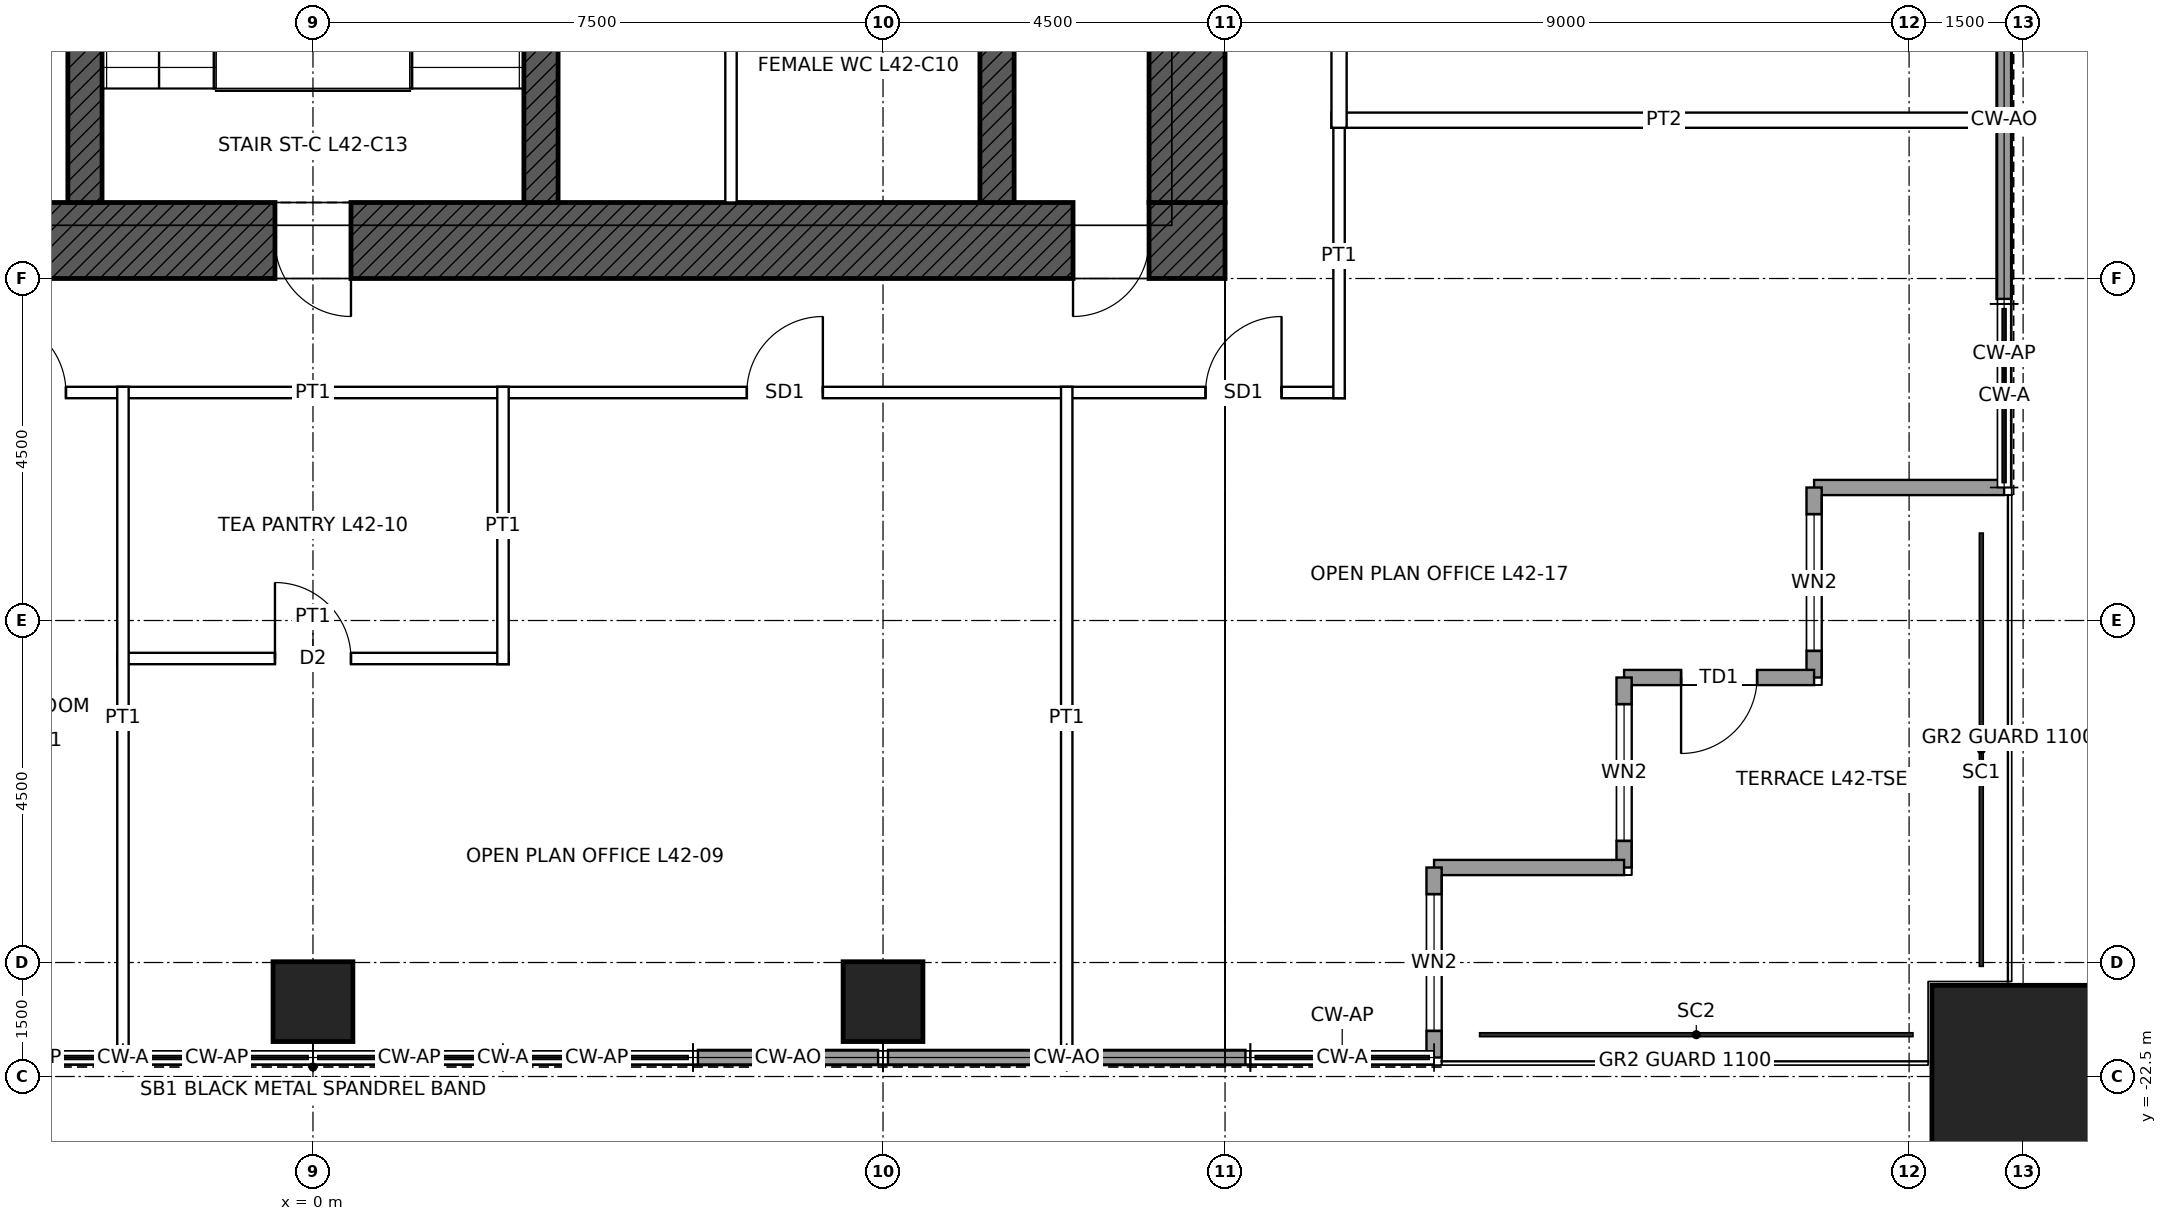
"""IFC4 building model, lengths in metres.
Left out: names, types, materials, properties, quantities, classifications, styles, units other than length and angle.
Written with IfcOpenShell. Run it as: python <this file> out.ifc"""

import sys

from ifc_helpers import new_model, si_unit, direction, frame, frame_2d, origin, origin_2d, place, context, subcontext, project, spatial, rectangle, hollow_rectangle, extrude, element, fill, save


model = new_model("IFC4")
c1 = context("Model", 3, precision=1e-05, world=origin(), true_north=direction((0.0, 1.0)))
c2 = subcontext(c1, "Body", "Model", "MODEL_VIEW")
j1 = project(units=[si_unit("LENGTHUNIT", "METRE"), si_unit("PLANEANGLEUNIT", "RADIAN")], contexts=[c1])
p1 = place(None, origin())
s1 = spatial("IfcSite", under=j1, at=p1, CompositionType="ELEMENT")
p2 = place(p1, origin())
s2 = spatial("IfcBuilding", under=s1, at=p2, CompositionType="ELEMENT")
p3 = place(p2, frame((0.0, 0.0, 201.9)))
s3 = spatial("IfcBuildingStorey", under=s2, at=p3, CompositionType="ELEMENT", Elevation=201.9)
p4 = place(p3, frame((22.5, -22.5, 0.0), z_axis=(0.0, 0.0, 1.0), x_axis=(1.0, 0.0, 0.0)))
e1 = element("IfcColumn", 1, at=p4, inside=s3, PredefinedType="COLUMN", context=c2, shape_type="SweptSolid", body=[
    extrude(hollow_rectangle(XDim=2.4, YDim=2.4, WallThickness=0.12, at=origin_2d()), origin(), (0.0, 0.0, 1.0), 4.0),
])
for number, where, z_axis, x_axis in (
    (2, (7.5, -21.515, 0.0), (0.0, 0.0, 1.0), (1.0, 0.0, 0.0)),
    (3, (0.0, -21.515, 0.0), (0.0, 0.0, 1.0), (1.0, 0.0, 0.0)),
):
    element("IfcColumn", number, at=place(p3, frame(where, z_axis=z_axis, x_axis=x_axis)), inside=s3, PredefinedType="COLUMN", context=c2, shape_type="SweptSolid", body=[
        extrude(hollow_rectangle(XDim=1.05, YDim=1.05, WallThickness=0.07, at=origin_2d()), origin(), (0.0, 0.0, 1.0), 4.0),
    ])
p5 = place(p3, frame((12.0, -11.5, 0.0), z_axis=(0.0, 0.0, 1.0), x_axis=(-1.0, 0.0, 0.0)))
e4 = element("IfcWall", 4, at=p5, inside=s3, PredefinedType="SHEAR", context=c2, shape_type="SweptSolid", body=[
    extrude(rectangle(XDim=24.0, YDim=1.0, at=frame_2d((12.0, 0.0))), origin(), (0.0, 0.0, 1.0), 4.0),
])
p6 = place(p5, frame((11.5, 0.0, 0.0)))
e5 = element("IfcOpeningElement", 5, at=p6, cuts=e4, PredefinedType="OPENING", context=c2, shape_type="SweptSolid", body=[
    extrude(rectangle(XDim=1.0, YDim=2.1, at=frame_2d((0.5, 1.05))), frame((0.0, 0.51, 0.0), z_axis=(0.0, -1.0, 0.0), x_axis=(1.0, 0.0, 0.0)), (0.0, 0.0, 1.0), 1.02),
])
p7 = place(p5, frame((1.0, 0.0, 0.0)))
e6 = element("IfcOpeningElement", 6, at=p7, cuts=e4, PredefinedType="OPENING", context=c2, shape_type="SweptSolid", body=[
    extrude(rectangle(XDim=1.0, YDim=2.4, at=frame_2d((0.5, 1.2))), frame((0.0, 0.51, 0.0), z_axis=(0.0, -1.0, 0.0), x_axis=(1.0, 0.0, 0.0)), (0.0, 0.0, 1.0), 1.02),
])
p8 = place(p3, frame((11.5, 11.0, 0.0), z_axis=(0.0, 0.0, 1.0), x_axis=(0.0, -1.0, 0.0)))
e7 = element("IfcWall", 7, at=p8, inside=s3, PredefinedType="SHEAR", context=c2, shape_type="SweptSolid", body=[
    extrude(rectangle(XDim=22.0, YDim=1.0, at=frame_2d((11.0, 0.0))), origin(), (0.0, 0.0, 1.0), 4.0),
])
p9 = place(p8, frame((10.5, 0.0, 0.0)))
e8 = element("IfcOpeningElement", 8, at=p9, cuts=e7, PredefinedType="OPENING", context=c2, shape_type="SweptSolid", body=[
    extrude(rectangle(XDim=1.0, YDim=2.4, at=frame_2d((0.5, 1.2))), frame((0.0, 0.51, 0.0), z_axis=(0.0, -1.0, 0.0), x_axis=(1.0, 0.0, 0.0)), (0.0, 0.0, 1.0), 1.02),
])
p10 = place(p3, frame((9.0, -11.0, 0.0), z_axis=(0.0, 0.0, 1.0), x_axis=(0.0, 1.0, 0.0)))
e9 = element("IfcWall", 9, at=p10, inside=s3, PredefinedType="SHEAR", context=c2, shape_type="SweptSolid", body=[
    extrude(rectangle(XDim=6.5, YDim=0.45, at=frame_2d((3.25, 0.0))), origin(), (0.0, 0.0, 1.0), 4.0),
])
p11 = place(p10, frame((4.25, 0.0, 0.0)))
e10 = element("IfcOpeningElement", 10, at=p11, cuts=e9, PredefinedType="OPENING", context=c2, shape_type="SweptSolid", body=[
    extrude(rectangle(XDim=1.0, YDim=2.1, at=frame_2d((0.5, 1.05))), frame((0.0, 0.235, 0.0), z_axis=(0.0, -1.0, 0.0), x_axis=(1.0, 0.0, 0.0)), (0.0, 0.0, 1.0), 0.47),
])
for number, where, z_axis, x_axis in (
    (11, (-3.0, -11.0, 0.0), (0.0, 0.0, 1.0), (0.0, 1.0, 0.0)),
    (12, (3.0, -11.0, 0.0), (0.0, 0.0, 1.0), (0.0, 1.0, 0.0)),
):
    element("IfcWall", number, at=place(p3, frame(where, z_axis=z_axis, x_axis=x_axis)), inside=s3, PredefinedType="SHEAR", context=c2, shape_type="SweptSolid", body=[
        extrude(rectangle(XDim=6.5, YDim=0.45, at=frame_2d((3.25, 0.0))), origin(), (0.0, 0.0, 1.0), 4.0),
    ])
p12 = place(p3, frame((22.25, -14.75, 0.0), z_axis=(0.0, 0.0, 1.0), x_axis=(-1.0, 0.0, 0.0)))
e13 = element("IfcWall", 13, at=p12, inside=s3, PredefinedType="SOLIDWALL", context=c2, shape_type="SweptSolid", body=[
    extrude(rectangle(XDim=2.5, YDim=0.2, at=frame_2d((1.25, 0.0))), origin(), (0.0, 0.0, 1.0), 3.85),
])
p13 = place(p3, frame((19.75, -14.75, 0.0), z_axis=(0.0, 0.0, 1.0), x_axis=(0.0, -1.0, 0.0)))
e14 = element("IfcWall", 14, at=p13, inside=s3, PredefinedType="SOLIDWALL", context=c2, shape_type="SweptSolid", body=[
    extrude(rectangle(XDim=2.5, YDim=0.2, at=frame_2d((1.25, 0.0))), origin(), (0.0, 0.0, 1.0), 3.85),
])
p14 = place(p13, frame((0.35, 0.0, 0.3)))
e15 = element("IfcOpeningElement", 15, at=p14, cuts=e14, PredefinedType="OPENING", context=c2, shape_type="SweptSolid", body=[
    extrude(rectangle(XDim=1.8, YDim=2.4, at=frame_2d((0.9, 1.2))), frame((0.0, 0.11, 0.0), z_axis=(0.0, -1.0, 0.0), x_axis=(1.0, 0.0, 0.0)), (0.0, 0.0, 1.0), 0.22),
])
p15 = place(p3, frame((19.75, -17.25, 0.0), z_axis=(0.0, 0.0, 1.0), x_axis=(-1.0, 0.0, 0.0)))
e16 = element("IfcWall", 16, at=p15, inside=s3, PredefinedType="SOLIDWALL", context=c2, shape_type="SweptSolid", body=[
    extrude(rectangle(XDim=2.5, YDim=0.2, at=frame_2d((1.25, 0.0))), origin(), (0.0, 0.0, 1.0), 3.85),
])
p16 = place(p15, frame((0.75, 0.0, 0.0)))
e17 = element("IfcOpeningElement", 17, at=p16, cuts=e16, PredefinedType="OPENING", context=c2, shape_type="SweptSolid", body=[
    extrude(rectangle(XDim=1.0, YDim=2.4, at=frame_2d((0.5, 1.2))), frame((0.0, 0.11, 0.0), z_axis=(0.0, -1.0, 0.0), x_axis=(1.0, 0.0, 0.0)), (0.0, 0.0, 1.0), 0.22),
])
p17 = place(p3, frame((17.25, -17.25, 0.0), z_axis=(0.0, 0.0, 1.0), x_axis=(0.0, -1.0, 0.0)))
e18 = element("IfcWall", 18, at=p17, inside=s3, PredefinedType="SOLIDWALL", context=c2, shape_type="SweptSolid", body=[
    extrude(rectangle(XDim=2.5, YDim=0.2, at=frame_2d((1.25, 0.0))), origin(), (0.0, 0.0, 1.0), 3.85),
])
p18 = place(p17, frame((0.35, 0.0, 0.3)))
e19 = element("IfcOpeningElement", 19, at=p18, cuts=e18, PredefinedType="OPENING", context=c2, shape_type="SweptSolid", body=[
    extrude(rectangle(XDim=1.8, YDim=2.4, at=frame_2d((0.9, 1.2))), frame((0.0, 0.11, 0.0), z_axis=(0.0, -1.0, 0.0), x_axis=(1.0, 0.0, 0.0)), (0.0, 0.0, 1.0), 0.22),
])
p19 = place(p3, frame((17.25, -19.75, 0.0), z_axis=(0.0, 0.0, 1.0), x_axis=(-1.0, 0.0, 0.0)))
e20 = element("IfcWall", 20, at=p19, inside=s3, PredefinedType="SOLIDWALL", context=c2, shape_type="SweptSolid", body=[
    extrude(rectangle(XDim=2.5, YDim=0.2, at=frame_2d((1.25, 0.0))), origin(), (0.0, 0.0, 1.0), 3.85),
])
p20 = place(p3, frame((14.75, -19.75, 0.0), z_axis=(0.0, 0.0, 1.0), x_axis=(0.0, -1.0, 0.0)))
e21 = element("IfcWall", 21, at=p20, inside=s3, PredefinedType="SOLIDWALL", context=c2, shape_type="SweptSolid", body=[
    extrude(rectangle(XDim=2.5, YDim=0.2, at=frame_2d((1.25, 0.0))), origin(), (0.0, 0.0, 1.0), 3.85),
])
p21 = place(p20, frame((0.35, 0.0, 0.3)))
e22 = element("IfcOpeningElement", 22, at=p21, cuts=e21, PredefinedType="OPENING", context=c2, shape_type="SweptSolid", body=[
    extrude(rectangle(XDim=1.8, YDim=2.4, at=frame_2d((0.9, 1.2))), frame((0.0, 0.11, 0.0), z_axis=(0.0, -1.0, 0.0), x_axis=(1.0, 0.0, 0.0)), (0.0, 0.0, 1.0), 0.22),
])
for number, where, z_axis, x_axis in (
    (23, (22.25, -7.565, 0.0), (0.0, 0.0, 1.0), (0.0, -1.0, 0.0)),
    (24, (22.25, -9.949, 0.0), (0.0, 0.0, 1.0), (0.0, -1.0, 0.0)),
    (25, (12.268, -22.25, 0.0), (0.0, 0.0, 1.0), (-1.0, 0.0, 0.0)),
    (26, (9.884, -22.25, 0.0), (0.0, 0.0, 1.0), (-1.0, 0.0, 0.0)),
):
    element("IfcWall", number, at=place(p3, frame(where, z_axis=z_axis, x_axis=x_axis)), inside=s3, PredefinedType="SOLIDWALL", context=c2, shape_type="SweptSolid", body=[
        extrude(rectangle(XDim=2.319, YDim=0.2, at=frame_2d((1.16, 0.0))), origin(), (0.0, 0.0, 1.0), 3.85),
    ])
p22 = place(p3, frame((7.435, -22.25, 0.0), z_axis=(0.0, 0.0, 1.0), x_axis=(-1.0, 0.0, 0.0)))
e27 = element("IfcWall", 27, at=p22, inside=s3, PredefinedType="SOLIDWALL", context=c2, shape_type="SweptSolid", body=[
    extrude(rectangle(XDim=2.37, YDim=0.2, at=frame_2d((1.185, 0.0))), origin(), (0.0, 0.0, 1.0), 3.85),
])
p23 = place(p3, frame((-2.575, -17.0, 0.0), z_axis=(0.0, 0.0, 1.0), x_axis=(1.0, 0.0, 0.0)))
e28 = element("IfcWall", 28, at=p23, inside=s3, PredefinedType="PARTITIONING", context=c2, shape_type="SweptSolid", body=[
    extrude(rectangle(XDim=5.15, YDim=0.15, at=frame_2d((2.575, 0.0))), origin(), (0.0, 0.0, 1.0), 3.85),
])
p24 = place(p23, frame((2.075, 0.0, 0.0)))
e29 = element("IfcOpeningElement", 29, at=p24, cuts=e28, PredefinedType="OPENING", context=c2, shape_type="SweptSolid", body=[
    extrude(rectangle(XDim=1.0, YDim=2.1, at=frame_2d((0.5, 1.05))), frame((0.0, 0.085, 0.0), z_axis=(0.0, -1.0, 0.0), x_axis=(1.0, 0.0, 0.0)), (0.0, 0.0, 1.0), 0.17),
])
p25 = place(p3, frame((-13.575, -13.5, 0.0), z_axis=(0.0, 0.0, 1.0), x_axis=(1.0, 0.0, 0.0)))
e30 = element("IfcWall", 30, at=p25, inside=s3, PredefinedType="PARTITIONING", context=c2, shape_type="SweptSolid", body=[
    extrude(rectangle(XDim=27.15, YDim=0.15, at=frame_2d((13.575, 0.0))), origin(), (0.0, 0.0, 1.0), 3.85),
])
p26 = place(p25, frame((19.283, 0.0, 0.0)))
e31 = element("IfcOpeningElement", 31, at=p26, cuts=e30, PredefinedType="OPENING", context=c2, shape_type="SweptSolid", body=[
    extrude(rectangle(XDim=1.0, YDim=2.4, at=frame_2d((0.5, 1.2))), frame((0.0, 0.085, 0.0), z_axis=(0.0, -1.0, 0.0), x_axis=(1.0, 0.0, 0.0)), (0.0, 0.0, 1.0), 0.17),
])
p27 = place(p25, frame((9.325, 0.0, 0.0)))
e32 = element("IfcOpeningElement", 32, at=p27, cuts=e30, PredefinedType="OPENING", context=c2, shape_type="SweptSolid", body=[
    extrude(rectangle(XDim=1.0, YDim=2.1, at=frame_2d((0.5, 1.05))), frame((0.0, 0.085, 0.0), z_axis=(0.0, -1.0, 0.0), x_axis=(1.0, 0.0, 0.0)), (0.0, 0.0, 1.0), 0.17),
])
p28 = place(p25, frame((3.825, 0.0, 0.0)))
e33 = element("IfcOpeningElement", 33, at=p28, cuts=e30, PredefinedType="OPENING", context=c2, shape_type="SweptSolid", body=[
    extrude(rectangle(XDim=1.0, YDim=2.4, at=frame_2d((0.5, 1.2))), frame((0.0, 0.085, 0.0), z_axis=(0.0, -1.0, 0.0), x_axis=(1.0, 0.0, 0.0)), (0.0, 0.0, 1.0), 0.17),
])
p29 = place(p25, frame((25.318, 0.0, 0.0)))
e34 = element("IfcOpeningElement", 34, at=p29, cuts=e30, PredefinedType="OPENING", context=c2, shape_type="SweptSolid", body=[
    extrude(rectangle(XDim=1.0, YDim=2.4, at=frame_2d((0.5, 1.2))), frame((0.0, 0.085, 0.0), z_axis=(0.0, -1.0, 0.0), x_axis=(1.0, 0.0, 0.0)), (0.0, 0.0, 1.0), 0.17),
])
p30 = place(p3, frame((13.4, -9.917, 0.0), z_axis=(0.0, 0.0, 1.0), x_axis=(1.0, 0.0, 0.0)))
e35 = element("IfcWall", 35, at=p30, inside=s3, PredefinedType="PARTITIONING", context=c2, shape_type="SweptSolid", body=[
    extrude(rectangle(XDim=8.75, YDim=0.2, at=frame_2d((4.375, 0.0))), origin(), (0.0, 0.0, 1.0), 3.85),
])
p31 = place(p3, frame((-2.5, -22.15, 0.0), z_axis=(0.0, 0.0, 1.0), x_axis=(0.0, 1.0, 0.0)))
e36 = element("IfcWall", 36, at=p31, inside=s3, PredefinedType="PARTITIONING", context=c2, shape_type="SweptSolid", body=[
    extrude(rectangle(XDim=8.725, YDim=0.15, at=frame_2d((4.362, 0.0))), origin(), (0.0, 0.0, 1.0), 3.85),
])
p32 = place(p3, frame((2.5, -17.075, 0.0), z_axis=(0.0, 0.0, 1.0), x_axis=(0.0, 1.0, 0.0)))
e37 = element("IfcWall", 37, at=p32, inside=s3, PredefinedType="PARTITIONING", context=c2, shape_type="SweptSolid", body=[
    extrude(rectangle(XDim=3.65, YDim=0.15, at=frame_2d((1.825, 0.0))), origin(), (0.0, 0.0, 1.0), 3.85),
])
p33 = place(p3, frame((9.917, -22.15, 0.0), z_axis=(0.0, 0.0, 1.0), x_axis=(0.0, 1.0, 0.0)))
e38 = element("IfcWall", 38, at=p33, inside=s3, PredefinedType="PARTITIONING", context=c2, shape_type="SweptSolid", body=[
    extrude(rectangle(XDim=8.725, YDim=0.15, at=frame_2d((4.362, 0.0))), origin(), (0.0, 0.0, 1.0), 3.85),
])
p34 = place(p3, frame((13.5, -13.575, 0.0), z_axis=(0.0, 0.0, 1.0), x_axis=(0.0, 1.0, 0.0)))
e39 = element("IfcWall", 39, at=p34, inside=s3, PredefinedType="PARTITIONING", context=c2, shape_type="SweptSolid", body=[
    extrude(rectangle(XDim=3.733, YDim=0.15, at=frame_2d((1.866, 0.0))), origin(), (0.0, 0.0, 1.0), 3.85),
])
p35 = place(p3, frame((13.5, -10.017, 0.0), z_axis=(0.0, 0.0, 1.0), x_axis=(0.0, 1.0, 0.0)))
e40 = element("IfcWall", 40, at=p35, inside=s3, PredefinedType="PARTITIONING", context=c2, shape_type="SweptSolid", body=[
    extrude(rectangle(XDim=5.117, YDim=0.2, at=frame_2d((2.559, 0.0))), origin(), (0.0, 0.0, 1.0), 3.85),
])
p36 = place(p35, frame((2.059, 0.0, 0.0)))
e41 = element("IfcOpeningElement", 41, at=p36, cuts=e40, PredefinedType="OPENING", context=c2, shape_type="SweptSolid", body=[
    extrude(rectangle(XDim=1.0, YDim=2.4, at=frame_2d((0.5, 1.2))), frame((0.0, 0.11, 0.0), z_axis=(0.0, -1.0, 0.0), x_axis=(1.0, 0.0, 0.0)), (0.0, 0.0, 1.0), 0.22),
])
p37 = place(p3, frame((5.5, -11.0, 0.0), z_axis=(0.0, 0.0, 1.0), x_axis=(0.0, 1.0, 0.0)))
e42 = element("IfcWall", 42, at=p37, inside=s3, PredefinedType="PARTITIONING", context=c2, shape_type="SweptSolid", body=[
    extrude(rectangle(XDim=6.275, YDim=0.15, at=frame_2d((3.137, 0.0))), origin(), (0.0, 0.0, 1.0), 3.75),
])
p38 = place(p37, frame((2.637, 0.0, 0.0)))
e43 = element("IfcOpeningElement", 43, at=p38, cuts=e42, PredefinedType="OPENING", context=c2, shape_type="SweptSolid", body=[
    extrude(rectangle(XDim=1.0, YDim=2.1, at=frame_2d((0.5, 1.05))), frame((0.0, 0.085, 0.0), z_axis=(0.0, -1.0, 0.0), x_axis=(1.0, 0.0, 0.0)), (0.0, 0.0, 1.0), 0.17),
])
p39 = place(p14, origin())
e44 = element("IfcWindow", 44, at=p39, inside=s3, PartitioningType="SINGLE_PANEL", PredefinedType="WINDOW", context=c2, shape_type="SweptSolid", body=[
    extrude(rectangle(XDim=1.8, YDim=2.4, at=frame_2d((0.9, 1.2))), frame((0.0, 0.03, 0.0), z_axis=(0.0, -1.0, 0.0), x_axis=(1.0, 0.0, 0.0)), (0.0, 0.0, 1.0), 0.06),
])
fill(e15, e44)
p40 = place(p16, origin())
e45 = element("IfcDoor", 45, at=p40, inside=s3, OperationType="SINGLE_SWING_RIGHT", PredefinedType="DOOR", context=c2, shape_type="SweptSolid", body=[
    extrude(rectangle(XDim=1.0, YDim=2.4, at=frame_2d((0.5, 1.2))), frame((0.0, 0.025, 0.0), z_axis=(0.0, -1.0, 0.0), x_axis=(1.0, 0.0, 0.0)), (0.0, 0.0, 1.0), 0.05),
])
fill(e17, e45)
p41 = place(p18, origin())
e46 = element("IfcWindow", 46, at=p41, inside=s3, PartitioningType="SINGLE_PANEL", PredefinedType="WINDOW", context=c2, shape_type="SweptSolid", body=[
    extrude(rectangle(XDim=1.8, YDim=2.4, at=frame_2d((0.9, 1.2))), frame((0.0, 0.03, 0.0), z_axis=(0.0, -1.0, 0.0), x_axis=(1.0, 0.0, 0.0)), (0.0, 0.0, 1.0), 0.06),
])
fill(e19, e46)
p42 = place(p21, origin())
e47 = element("IfcWindow", 47, at=p42, inside=s3, PartitioningType="SINGLE_PANEL", PredefinedType="WINDOW", context=c2, shape_type="SweptSolid", body=[
    extrude(rectangle(XDim=1.8, YDim=2.4, at=frame_2d((0.9, 1.2))), frame((0.0, 0.03, 0.0), z_axis=(0.0, -1.0, 0.0), x_axis=(1.0, 0.0, 0.0)), (0.0, 0.0, 1.0), 0.06),
])
fill(e22, e47)
p43 = place(p6, origin())
e48 = element("IfcDoor", 48, at=p43, inside=s3, OperationType="SINGLE_SWING_LEFT", PredefinedType="DOOR", context=c2, shape_type="SweptSolid", body=[
    extrude(rectangle(XDim=1.0, YDim=2.1, at=frame_2d((0.5, 1.05))), frame((0.0, 0.485, 0.0), z_axis=(0.0, -1.0, 0.0), x_axis=(1.0, 0.0, 0.0)), (0.0, 0.0, 1.0), 0.05),
])
fill(e5, e48)
p44 = place(p7, origin())
e49 = element("IfcDoor", 49, at=p44, inside=s3, OperationType="SINGLE_SWING_RIGHT", PredefinedType="DOOR", context=c2, shape_type="SweptSolid", body=[
    extrude(rectangle(XDim=1.0, YDim=2.4, at=frame_2d((0.5, 1.2))), frame((0.0, 0.485, 0.0), z_axis=(0.0, -1.0, 0.0), x_axis=(1.0, 0.0, 0.0)), (0.0, 0.0, 1.0), 0.05),
])
fill(e6, e49)
p45 = place(p26, origin())
e50 = element("IfcDoor", 50, at=p45, inside=s3, OperationType="SINGLE_SWING_RIGHT", PredefinedType="DOOR", context=c2, shape_type="SweptSolid", body=[
    extrude(rectangle(XDim=1.0, YDim=2.4, at=frame_2d((0.5, 1.2))), frame((0.0, 0.025, 0.0), z_axis=(0.0, -1.0, 0.0), x_axis=(1.0, 0.0, 0.0)), (0.0, 0.0, 1.0), 0.05),
])
fill(e31, e50)
p46 = place(p24, origin())
e51 = element("IfcDoor", 51, at=p46, inside=s3, OperationType="SINGLE_SWING_LEFT", PredefinedType="DOOR", context=c2, shape_type="SweptSolid", body=[
    extrude(rectangle(XDim=1.0, YDim=2.1, at=frame_2d((0.5, 1.05))), frame((0.0, 0.025, 0.0), z_axis=(0.0, -1.0, 0.0), x_axis=(1.0, 0.0, 0.0)), (0.0, 0.0, 1.0), 0.05),
])
fill(e29, e51)
p47 = place(p27, origin())
e52 = element("IfcDoor", 52, at=p47, inside=s3, OperationType="SINGLE_SWING_LEFT", PredefinedType="DOOR", context=c2, shape_type="SweptSolid", body=[
    extrude(rectangle(XDim=1.0, YDim=2.1, at=frame_2d((0.5, 1.05))), frame((0.0, 0.025, 0.0), z_axis=(0.0, -1.0, 0.0), x_axis=(1.0, 0.0, 0.0)), (0.0, 0.0, 1.0), 0.05),
])
fill(e32, e52)
p48 = place(p29, origin())
e53 = element("IfcDoor", 53, at=p48, inside=s3, OperationType="SINGLE_SWING_RIGHT", PredefinedType="DOOR", context=c2, shape_type="SweptSolid", body=[
    extrude(rectangle(XDim=1.0, YDim=2.4, at=frame_2d((0.5, 1.2))), frame((0.0, 0.025, 0.0), z_axis=(0.0, -1.0, 0.0), x_axis=(1.0, 0.0, 0.0)), (0.0, 0.0, 1.0), 0.05),
])
fill(e34, e53)
save(model, sys.argv[1])
